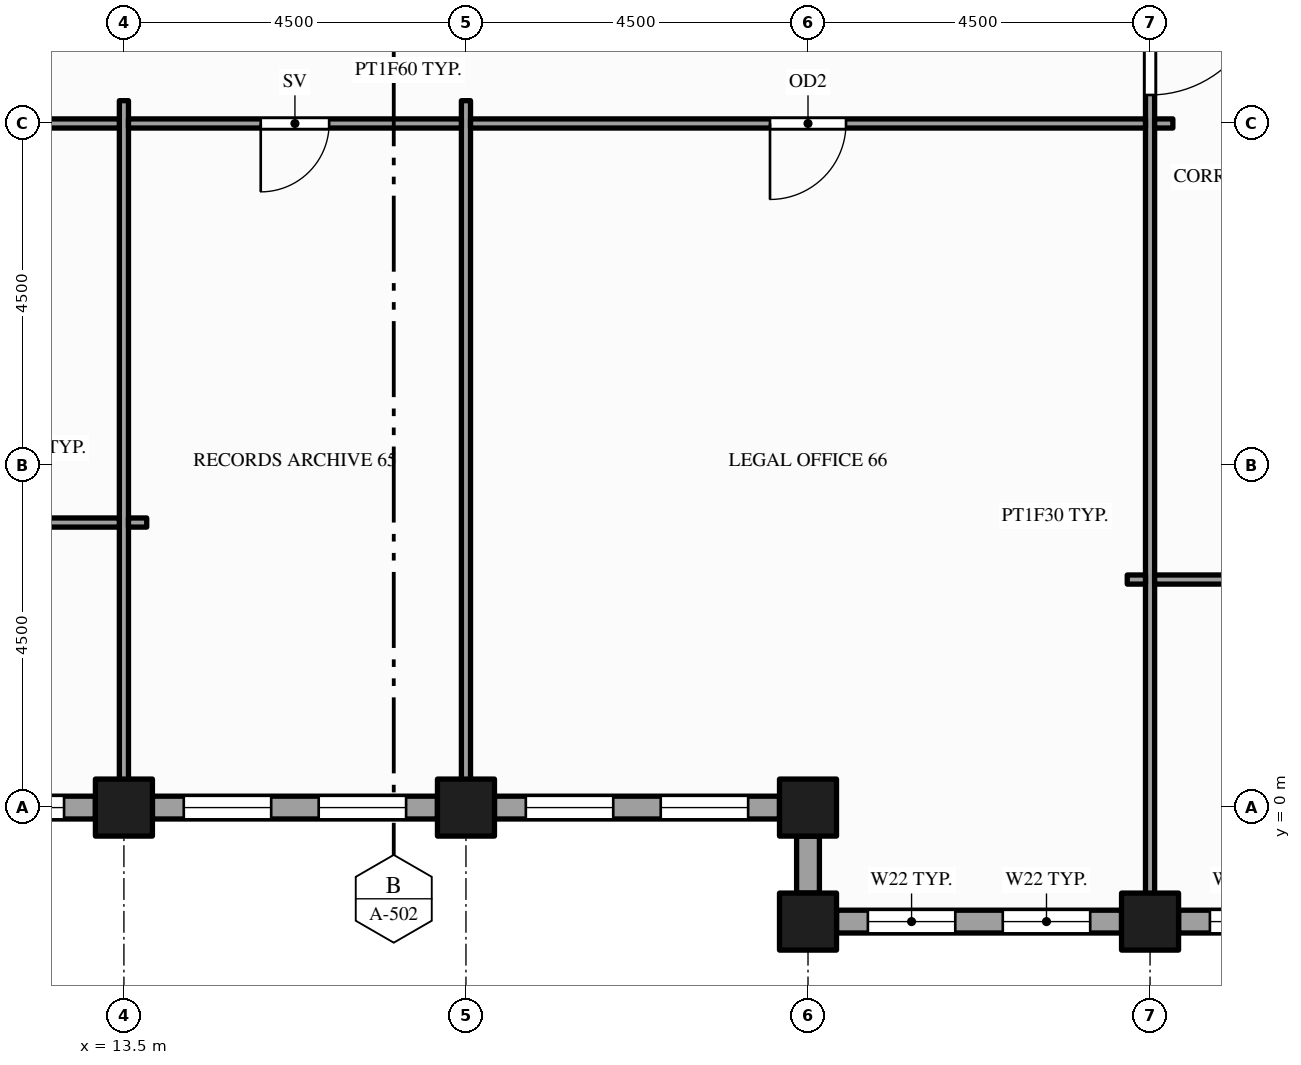
"""IFC4 building model, lengths in metres.
Left out: names, types, materials, properties, quantities, classifications, styles, units other than length and angle.
Written with IfcOpenShell. Run it as: python <this file> out.ifc"""

import sys

from ifc_helpers import new_model, si_unit, direction, frame, frame_2d, origin, origin_2d, place, context, subcontext, project, spatial, rectangle, hollow_rectangle, extrude, element, fill, save


model = new_model("IFC4")
c1 = context("Model", 3, precision=1e-05, world=origin(), true_north=direction((0.0, 1.0)))
c2 = subcontext(c1, "Body", "Model", "MODEL_VIEW")
j1 = project(units=[si_unit("LENGTHUNIT", "METRE"), si_unit("PLANEANGLEUNIT", "RADIAN")], contexts=[c1])
p1 = place(None, origin())
s1 = spatial("IfcSite", under=j1, at=p1, CompositionType="ELEMENT")
p2 = place(p1, origin())
s2 = spatial("IfcBuilding", under=s1, at=p2, CompositionType="ELEMENT")
p3 = place(p2, frame((0.0, 0.0, 227.0)))
s3 = spatial("IfcBuildingStorey", under=s2, at=p3, CompositionType="ELEMENT", Elevation=227.0)
for number, where, z_axis, x_axis in (
    (1, (13.5, 0.0, -0.15), (0.0, 0.0, 1.0), (1.0, 0.0, 0.0)),
    (2, (18.0, 0.0, -0.15), (0.0, 0.0, 1.0), (1.0, 0.0, 0.0)),
    (3, (22.5, -1.5, -0.15), (0.0, 0.0, 1.0), (1.0, 0.0, 0.0)),
    (4, (22.5, 0.0, -0.15), (0.0, 0.0, 1.0), (1.0, 0.0, 0.0)),
    (5, (27.0, -1.5, -0.15), (0.0, 0.0, 1.0), (1.0, 0.0, 0.0)),
):
    element("IfcColumn", number, at=place(p3, frame(where, z_axis=z_axis, x_axis=x_axis)), inside=s3, PredefinedType="COLUMN", context=c2, shape_type="SweptSolid", body=[
        extrude(hollow_rectangle(XDim=0.75, YDim=0.75, WallThickness=0.036, at=origin_2d()), origin(), (0.0, 0.0, 1.0), 4.0),
    ])
p4 = place(p3, frame((22.875, -1.5, 0.0), z_axis=(0.0, 0.0, 1.0), x_axis=(1.0, 0.0, 0.0)))
e6 = element("IfcWall", 6, at=p4, inside=s3, PredefinedType="STANDARD", context=c2, shape_type="SweptSolid", body=[
    extrude(rectangle(XDim=3.75, YDim=0.3, at=frame_2d((1.875, 0.0))), origin(), (0.0, 0.0, 1.0), 2.76),
])
p5 = place(p4, frame((0.413, 0.0, 0.9)))
e7 = element("IfcOpeningElement", 7, at=p5, cuts=e6, PredefinedType="OPENING", context=c2, shape_type="SweptSolid", body=[
    extrude(rectangle(XDim=1.15, YDim=1.5, at=frame_2d((0.575, 0.75))), frame((0.0, 0.16, 0.0), z_axis=(0.0, -1.0, 0.0), x_axis=(1.0, 0.0, 0.0)), (0.0, 0.0, 1.0), 0.32),
])
p6 = place(p4, frame((2.188, 0.0, 0.9)))
e8 = element("IfcOpeningElement", 8, at=p6, cuts=e6, PredefinedType="OPENING", context=c2, shape_type="SweptSolid", body=[
    extrude(rectangle(XDim=1.15, YDim=1.5, at=frame_2d((0.575, 0.75))), frame((0.0, 0.16, 0.0), z_axis=(0.0, -1.0, 0.0), x_axis=(1.0, 0.0, 0.0)), (0.0, 0.0, 1.0), 0.32),
])
p7 = place(p3, frame((27.375, -1.5, 0.0), z_axis=(0.0, 0.0, 1.0), x_axis=(1.0, 0.0, 0.0)))
e9 = element("IfcWall", 9, at=p7, inside=s3, PredefinedType="STANDARD", context=c2, shape_type="SweptSolid", body=[
    extrude(rectangle(XDim=3.75, YDim=0.3, at=frame_2d((1.875, 0.0))), origin(), (0.0, 0.0, 1.0), 2.87),
])
p8 = place(p7, frame((0.413, 0.0, 0.9)))
e10 = element("IfcOpeningElement", 10, at=p8, cuts=e9, PredefinedType="OPENING", context=c2, shape_type="SweptSolid", body=[
    extrude(rectangle(XDim=1.15, YDim=1.75, at=frame_2d((0.575, 0.875))), frame((0.0, 0.16, 0.0), z_axis=(0.0, -1.0, 0.0), x_axis=(1.0, 0.0, 0.0)), (0.0, 0.0, 1.0), 0.32),
])
p9 = place(p7, frame((2.188, 0.0, 0.9)))
e11 = element("IfcOpeningElement", 11, at=p9, cuts=e9, PredefinedType="OPENING", context=c2, shape_type="SweptSolid", body=[
    extrude(rectangle(XDim=1.15, YDim=1.75, at=frame_2d((0.575, 0.875))), frame((0.0, 0.16, 0.0), z_axis=(0.0, -1.0, 0.0), x_axis=(1.0, 0.0, 0.0)), (0.0, 0.0, 1.0), 0.32),
])
p10 = place(p3, frame((9.375, 0.0, 0.0), z_axis=(0.0, 0.0, 1.0), x_axis=(1.0, 0.0, 0.0)))
e12 = element("IfcWall", 12, at=p10, inside=s3, PredefinedType="STANDARD", context=c2, shape_type="SweptSolid", body=[
    extrude(rectangle(XDim=3.75, YDim=0.3, at=frame_2d((1.875, 0.0))), origin(), (0.0, 0.0, 1.0), 2.87),
])
p11 = place(p10, frame((0.413, 0.0, 0.9)))
e13 = element("IfcOpeningElement", 13, at=p11, cuts=e12, PredefinedType="OPENING", context=c2, shape_type="SweptSolid", body=[
    extrude(rectangle(XDim=1.15, YDim=1.75, at=frame_2d((0.575, 0.875))), frame((0.0, 0.16, 0.0), z_axis=(0.0, -1.0, 0.0), x_axis=(1.0, 0.0, 0.0)), (0.0, 0.0, 1.0), 0.32),
])
p12 = place(p10, frame((2.188, 0.0, 0.9)))
e14 = element("IfcOpeningElement", 14, at=p12, cuts=e12, PredefinedType="OPENING", context=c2, shape_type="SweptSolid", body=[
    extrude(rectangle(XDim=1.15, YDim=1.75, at=frame_2d((0.575, 0.875))), frame((0.0, 0.16, 0.0), z_axis=(0.0, -1.0, 0.0), x_axis=(1.0, 0.0, 0.0)), (0.0, 0.0, 1.0), 0.32),
])
p13 = place(p3, frame((13.875, 0.0, 0.0), z_axis=(0.0, 0.0, 1.0), x_axis=(1.0, 0.0, 0.0)))
e15 = element("IfcWall", 15, at=p13, inside=s3, PredefinedType="STANDARD", context=c2, shape_type="SweptSolid", body=[
    extrude(rectangle(XDim=3.75, YDim=0.3, at=frame_2d((1.875, 0.0))), origin(), (0.0, 0.0, 1.0), 2.87),
])
p14 = place(p13, frame((0.413, 0.0, 0.9)))
e16 = element("IfcOpeningElement", 16, at=p14, cuts=e15, PredefinedType="OPENING", context=c2, shape_type="SweptSolid", body=[
    extrude(rectangle(XDim=1.15, YDim=1.75, at=frame_2d((0.575, 0.875))), frame((0.0, 0.16, 0.0), z_axis=(0.0, -1.0, 0.0), x_axis=(1.0, 0.0, 0.0)), (0.0, 0.0, 1.0), 0.32),
])
p15 = place(p13, frame((2.188, 0.0, 0.9)))
e17 = element("IfcOpeningElement", 17, at=p15, cuts=e15, PredefinedType="OPENING", context=c2, shape_type="SweptSolid", body=[
    extrude(rectangle(XDim=1.15, YDim=1.75, at=frame_2d((0.575, 0.875))), frame((0.0, 0.16, 0.0), z_axis=(0.0, -1.0, 0.0), x_axis=(1.0, 0.0, 0.0)), (0.0, 0.0, 1.0), 0.32),
])
p16 = place(p3, frame((18.375, 0.0, 0.0), z_axis=(0.0, 0.0, 1.0), x_axis=(1.0, 0.0, 0.0)))
e18 = element("IfcWall", 18, at=p16, inside=s3, PredefinedType="STANDARD", context=c2, shape_type="SweptSolid", body=[
    extrude(rectangle(XDim=3.75, YDim=0.3, at=frame_2d((1.875, 0.0))), origin(), (0.0, 0.0, 1.0), 2.87),
])
p17 = place(p16, frame((0.413, 0.0, 0.9)))
e19 = element("IfcOpeningElement", 19, at=p17, cuts=e18, PredefinedType="OPENING", context=c2, shape_type="SweptSolid", body=[
    extrude(rectangle(XDim=1.15, YDim=1.75, at=frame_2d((0.575, 0.875))), frame((0.0, 0.16, 0.0), z_axis=(0.0, -1.0, 0.0), x_axis=(1.0, 0.0, 0.0)), (0.0, 0.0, 1.0), 0.32),
])
p18 = place(p16, frame((2.188, 0.0, 0.9)))
e20 = element("IfcOpeningElement", 20, at=p18, cuts=e18, PredefinedType="OPENING", context=c2, shape_type="SweptSolid", body=[
    extrude(rectangle(XDim=1.15, YDim=1.75, at=frame_2d((0.575, 0.875))), frame((0.0, 0.16, 0.0), z_axis=(0.0, -1.0, 0.0), x_axis=(1.0, 0.0, 0.0)), (0.0, 0.0, 1.0), 0.32),
])
p19 = place(p3, frame((22.5, -0.375, 0.0), z_axis=(0.0, 0.0, 1.0), x_axis=(0.0, -1.0, 0.0)))
e21 = element("IfcWall", 21, at=p19, inside=s3, PredefinedType="STANDARD", context=c2, shape_type="SweptSolid", body=[
    extrude(rectangle(XDim=0.75, YDim=0.3, at=frame_2d((0.375, 0.0))), origin(), (0.0, 0.0, 1.0), 3.157),
])
for number, where, z_axis, x_axis in (
    (22, (13.5, 0.15, 0.0), (0.0, 0.0, 1.0), (0.0, 1.0, 0.0)),
    (23, (18.0, 0.15, 0.0), (0.0, 0.0, 1.0), (0.0, 1.0, 0.0)),
):
    element("IfcWall", number, at=place(p3, frame(where, z_axis=z_axis, x_axis=x_axis)), inside=s3, PredefinedType="PARTITIONING", context=c2, shape_type="SweptSolid", body=[
        extrude(rectangle(XDim=9.15, YDim=0.12, at=frame_2d((4.575, 0.0))), origin(), (0.0, 0.0, 1.0), 2.87),
    ])
p20 = place(p3, frame((27.0, -1.35, 0.0), z_axis=(0.0, 0.0, 1.0), x_axis=(0.0, 1.0, 0.0)))
e24 = element("IfcWall", 24, at=p20, inside=s3, PredefinedType="PARTITIONING", context=c2, shape_type="SweptSolid", body=[
    extrude(rectangle(XDim=22.48, YDim=0.12, at=frame_2d((11.24, 0.0))), origin(), (0.0, 0.0, 1.0), 2.87),
])
p21 = place(p20, frame((10.725, 0.0, 0.0)))
e25 = element("IfcOpeningElement", 25, at=p21, cuts=e24, PredefinedType="OPENING", context=c2, shape_type="SweptSolid", body=[
    extrude(rectangle(XDim=1.5, YDim=2.1, at=frame_2d((0.75, 1.05))), frame((0.0, 0.07, 0.0), z_axis=(0.0, -1.0, 0.0), x_axis=(1.0, 0.0, 0.0)), (0.0, 0.0, 1.0), 0.14),
])
p22 = place(p20, frame((14.625, 0.0, 0.0)))
e26 = element("IfcOpeningElement", 26, at=p22, cuts=e24, PredefinedType="OPENING", context=c2, shape_type="SweptSolid", body=[
    extrude(rectangle(XDim=1.2, YDim=2.1, at=frame_2d((0.6, 1.05))), frame((0.0, 0.07, 0.0), z_axis=(0.0, -1.0, 0.0), x_axis=(1.0, 0.0, 0.0)), (0.0, 0.0, 1.0), 0.14),
])
p23 = place(p3, frame((26.7, 3.0, 0.0), z_axis=(0.0, 0.0, 1.0), x_axis=(1.0, 0.0, 0.0)))
e27 = element("IfcWall", 27, at=p23, inside=s3, PredefinedType="PARTITIONING", context=c2, shape_type="SweptSolid", body=[
    extrude(rectangle(XDim=0.24, YDim=0.12, at=frame_2d((0.12, 0.0))), origin(), (0.0, 0.0, 1.0), 2.87),
])
p24 = place(p3, frame((27.06, 3.0, 0.0), z_axis=(0.0, 0.0, 1.0), x_axis=(1.0, 0.0, 0.0)))
e28 = element("IfcWall", 28, at=p24, inside=s3, PredefinedType="PARTITIONING", context=c2, shape_type="SweptSolid", body=[
    extrude(rectangle(XDim=2.13, YDim=0.12, at=frame_2d((1.065, 0.0))), origin(), (0.0, 0.0, 1.0), 2.87),
])
p25 = place(p3, frame((9.125, 3.75, 0.0), z_axis=(0.0, 0.0, 1.0), x_axis=(1.0, 0.0, 0.0)))
e29 = element("IfcWall", 29, at=p25, inside=s3, PredefinedType="PARTITIONING", context=c2, shape_type="SweptSolid", body=[
    extrude(rectangle(XDim=4.315, YDim=0.12, at=frame_2d((2.157, 0.0))), origin(), (0.0, 0.0, 1.0), 2.87),
])
p26 = place(p3, frame((13.56, 3.75, 0.0), z_axis=(0.0, 0.0, 1.0), x_axis=(1.0, 0.0, 0.0)))
e30 = element("IfcWall", 30, at=p26, inside=s3, PredefinedType="PARTITIONING", context=c2, shape_type="SweptSolid", body=[
    extrude(rectangle(XDim=0.24, YDim=0.12, at=frame_2d((0.12, 0.0))), origin(), (0.0, 0.0, 1.0), 2.87),
])
p27 = place(p3, frame((0.15, 9.0, 0.0), z_axis=(0.0, 0.0, 1.0), x_axis=(1.0, 0.0, 0.0)))
e31 = element("IfcWall", 31, at=p27, inside=s3, PredefinedType="PARTITIONING", context=c2, shape_type="SweptSolid", body=[
    extrude(rectangle(XDim=13.29, YDim=0.12, at=frame_2d((6.645, 0.0))), origin(), (0.0, 0.0, 1.0), 2.87),
])
p28 = place(p27, frame((6.055, 0.0, 0.0)))
e32 = element("IfcOpeningElement", 32, at=p28, cuts=e31, PredefinedType="OPENING", context=c2, shape_type="SweptSolid", body=[
    extrude(rectangle(XDim=1.2, YDim=2.1, at=frame_2d((0.6, 1.05))), frame((0.0, 0.07, 0.0), z_axis=(0.0, -1.0, 0.0), x_axis=(1.0, 0.0, 0.0)), (0.0, 0.0, 1.0), 0.14),
])
p29 = place(p3, frame((13.56, 9.0, 0.0), z_axis=(0.0, 0.0, 1.0), x_axis=(1.0, 0.0, 0.0)))
e33 = element("IfcWall", 33, at=p29, inside=s3, PredefinedType="PARTITIONING", context=c2, shape_type="SweptSolid", body=[
    extrude(rectangle(XDim=4.38, YDim=0.12, at=frame_2d((2.19, 0.0))), origin(), (0.0, 0.0, 1.0), 2.87),
])
p30 = place(p29, frame((1.74, 0.0, 0.0)))
e34 = element("IfcOpeningElement", 34, at=p30, cuts=e33, PredefinedType="OPENING", context=c2, shape_type="SweptSolid", body=[
    extrude(rectangle(XDim=0.9, YDim=2.1, at=frame_2d((0.45, 1.05))), frame((0.0, 0.07, 0.0), z_axis=(0.0, -1.0, 0.0), x_axis=(1.0, 0.0, 0.0)), (0.0, 0.0, 1.0), 0.14),
])
p31 = place(p3, frame((18.06, 9.0, 0.0), z_axis=(0.0, 0.0, 1.0), x_axis=(1.0, 0.0, 0.0)))
e35 = element("IfcWall", 35, at=p31, inside=s3, PredefinedType="PARTITIONING", context=c2, shape_type="SweptSolid", body=[
    extrude(rectangle(XDim=8.88, YDim=0.12, at=frame_2d((4.44, 0.0))), origin(), (0.0, 0.0, 1.0), 2.76),
])
p32 = place(p31, frame((3.94, 0.0, 0.0)))
e36 = element("IfcOpeningElement", 36, at=p32, cuts=e35, PredefinedType="OPENING", context=c2, shape_type="SweptSolid", body=[
    extrude(rectangle(XDim=1.0, YDim=2.1, at=frame_2d((0.5, 1.05))), frame((0.0, 0.07, 0.0), z_axis=(0.0, -1.0, 0.0), x_axis=(1.0, 0.0, 0.0)), (0.0, 0.0, 1.0), 0.14),
])
p33 = place(p3, frame((27.06, 9.0, 0.0), z_axis=(0.0, 0.0, 1.0), x_axis=(1.0, 0.0, 0.0)))
e37 = element("IfcWall", 37, at=p33, inside=s3, PredefinedType="PARTITIONING", context=c2, shape_type="SweptSolid", body=[
    extrude(rectangle(XDim=0.24, YDim=0.12, at=frame_2d((0.12, 0.0))), origin(), (0.0, 0.0, 1.0), 2.87),
])
p34 = place(p5, origin())
e38 = element("IfcWindow", 38, at=p34, inside=s3, PartitioningType="SINGLE_PANEL", PredefinedType="WINDOW", context=c2, shape_type="SweptSolid", body=[
    extrude(rectangle(XDim=1.15, YDim=1.5, at=frame_2d((0.575, 0.75))), frame((0.0, 0.03, 0.0), z_axis=(0.0, -1.0, 0.0), x_axis=(1.0, 0.0, 0.0)), (0.0, 0.0, 1.0), 0.06),
])
fill(e7, e38)
p35 = place(p6, origin())
e39 = element("IfcWindow", 39, at=p35, inside=s3, PartitioningType="SINGLE_PANEL", PredefinedType="WINDOW", context=c2, shape_type="SweptSolid", body=[
    extrude(rectangle(XDim=1.15, YDim=1.5, at=frame_2d((0.575, 0.75))), frame((0.0, 0.03, 0.0), z_axis=(0.0, -1.0, 0.0), x_axis=(1.0, 0.0, 0.0)), (0.0, 0.0, 1.0), 0.06),
])
fill(e8, e39)
p36 = place(p8, origin())
e40 = element("IfcWindow", 40, at=p36, inside=s3, PartitioningType="SINGLE_PANEL", PredefinedType="WINDOW", context=c2, shape_type="SweptSolid", body=[
    extrude(rectangle(XDim=1.15, YDim=1.75, at=frame_2d((0.575, 0.875))), frame((0.0, 0.03, 0.0), z_axis=(0.0, -1.0, 0.0), x_axis=(1.0, 0.0, 0.0)), (0.0, 0.0, 1.0), 0.06),
])
fill(e10, e40)
p37 = place(p12, origin())
e41 = element("IfcWindow", 41, at=p37, inside=s3, PartitioningType="SINGLE_PANEL", PredefinedType="WINDOW", context=c2, shape_type="SweptSolid", body=[
    extrude(rectangle(XDim=1.15, YDim=1.75, at=frame_2d((0.575, 0.875))), frame((0.0, 0.03, 0.0), z_axis=(0.0, -1.0, 0.0), x_axis=(1.0, 0.0, 0.0)), (0.0, 0.0, 1.0), 0.06),
])
fill(e14, e41)
p38 = place(p14, origin())
e42 = element("IfcWindow", 42, at=p38, inside=s3, PartitioningType="SINGLE_PANEL", PredefinedType="WINDOW", context=c2, shape_type="SweptSolid", body=[
    extrude(rectangle(XDim=1.15, YDim=1.75, at=frame_2d((0.575, 0.875))), frame((0.0, 0.03, 0.0), z_axis=(0.0, -1.0, 0.0), x_axis=(1.0, 0.0, 0.0)), (0.0, 0.0, 1.0), 0.06),
])
fill(e16, e42)
p39 = place(p15, origin())
e43 = element("IfcWindow", 43, at=p39, inside=s3, PartitioningType="SINGLE_PANEL", PredefinedType="WINDOW", context=c2, shape_type="SweptSolid", body=[
    extrude(rectangle(XDim=1.15, YDim=1.75, at=frame_2d((0.575, 0.875))), frame((0.0, 0.03, 0.0), z_axis=(0.0, -1.0, 0.0), x_axis=(1.0, 0.0, 0.0)), (0.0, 0.0, 1.0), 0.06),
])
fill(e17, e43)
p40 = place(p17, origin())
e44 = element("IfcWindow", 44, at=p40, inside=s3, PartitioningType="SINGLE_PANEL", PredefinedType="WINDOW", context=c2, shape_type="SweptSolid", body=[
    extrude(rectangle(XDim=1.15, YDim=1.75, at=frame_2d((0.575, 0.875))), frame((0.0, 0.03, 0.0), z_axis=(0.0, -1.0, 0.0), x_axis=(1.0, 0.0, 0.0)), (0.0, 0.0, 1.0), 0.06),
])
fill(e19, e44)
p41 = place(p18, origin())
e45 = element("IfcWindow", 45, at=p41, inside=s3, PartitioningType="SINGLE_PANEL", PredefinedType="WINDOW", context=c2, shape_type="SweptSolid", body=[
    extrude(rectangle(XDim=1.15, YDim=1.75, at=frame_2d((0.575, 0.875))), frame((0.0, 0.03, 0.0), z_axis=(0.0, -1.0, 0.0), x_axis=(1.0, 0.0, 0.0)), (0.0, 0.0, 1.0), 0.06),
])
fill(e20, e45)
p42 = place(p21, origin())
e46 = element("IfcDoor", 46, at=p42, inside=s3, OperationType="SINGLE_SWING_RIGHT", PredefinedType="DOOR", context=c2, shape_type="SweptSolid", body=[
    extrude(rectangle(XDim=1.5, YDim=2.1, at=frame_2d((0.75, 1.05))), frame((0.0, 0.025, 0.0), z_axis=(0.0, -1.0, 0.0), x_axis=(1.0, 0.0, 0.0)), (0.0, 0.0, 1.0), 0.05),
])
fill(e25, e46)
p43 = place(p30, origin())
e47 = element("IfcDoor", 47, at=p43, inside=s3, OperationType="SINGLE_SWING_LEFT", PredefinedType="DOOR", context=c2, shape_type="SweptSolid", body=[
    extrude(rectangle(XDim=0.9, YDim=2.1, at=frame_2d((0.45, 1.05))), frame((0.0, 0.025, 0.0), z_axis=(0.0, -1.0, 0.0), x_axis=(1.0, 0.0, 0.0)), (0.0, 0.0, 1.0), 0.05),
])
fill(e34, e47)
p44 = place(p32, origin())
e48 = element("IfcDoor", 48, at=p44, inside=s3, OperationType="SINGLE_SWING_LEFT", PredefinedType="DOOR", context=c2, shape_type="SweptSolid", body=[
    extrude(rectangle(XDim=1.0, YDim=2.1, at=frame_2d((0.5, 1.05))), frame((0.0, 0.025, 0.0), z_axis=(0.0, -1.0, 0.0), x_axis=(1.0, 0.0, 0.0)), (0.0, 0.0, 1.0), 0.05),
])
fill(e36, e48)
save(model, sys.argv[1])
